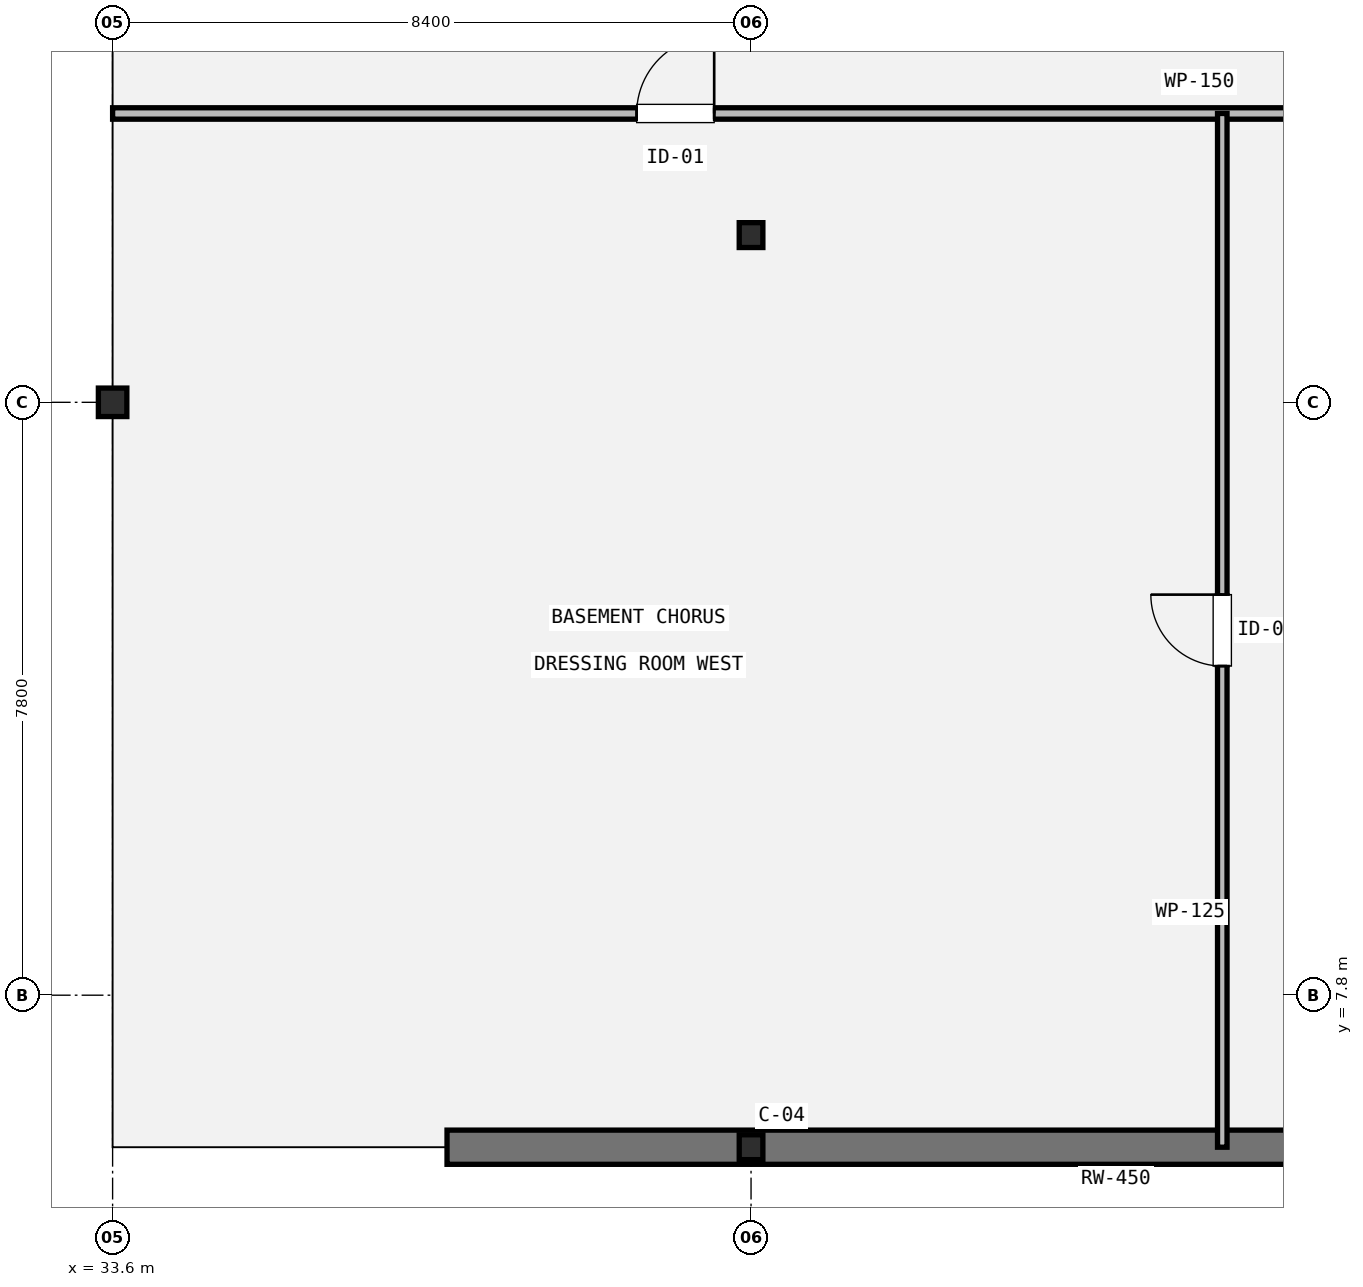
"""IFC4 building model, lengths in metres.
Left out: names, types, materials, properties, quantities, classifications, styles, units other than length and angle.
Written with IfcOpenShell. Run it as: python <this file> out.ifc"""

import sys

from ifc_helpers import new_model, si_unit, direction, frame, frame_2d, origin, origin_2d, place, context, subcontext, project, spatial, rectangle, i_section, extrude, element, fill, save


model = new_model("IFC4")
c1 = context("Model", 3, precision=1e-05, world=origin(), true_north=direction((0.0, 1.0)))
c2 = subcontext(c1, "Body", "Model", "MODEL_VIEW")
j1 = project(units=[si_unit("LENGTHUNIT", "METRE"), si_unit("PLANEANGLEUNIT", "RADIAN")], contexts=[c1])
p1 = place(None, origin())
s1 = spatial("IfcSite", under=j1, at=p1, CompositionType="ELEMENT")
p2 = place(p1, origin())
s2 = spatial("IfcBuilding", under=s1, at=p2, CompositionType="ELEMENT")
p3 = place(p2, frame((0.0, 0.0, -4.5)))
s3 = spatial("IfcBuildingStorey", under=s2, at=p3, CompositionType="ELEMENT", Elevation=-4.5)
p4 = place(p3, frame((33.6, 15.6, 0.0), z_axis=(0.0, 0.0, 1.0), x_axis=(1.0, 0.0, 0.0)))
e1 = element("IfcColumn", 1, at=p4, inside=s3, PredefinedType="COLUMN", context=c2, shape_type="SweptSolid", body=[
    extrude(i_section(OverallWidth=0.375, OverallDepth=0.375, WebThickness=0.017, FlangeThickness=0.027, FilletRadius=0.015, at=origin_2d()), origin(), (0.0, 0.0, 1.0), 4.5),
])
for number, where, z_axis, x_axis in (
    (2, (42.0, 5.8, 0.0), (0.0, 0.0, 1.0), (1.0, 0.0, 0.0)),
    (3, (42.0, 17.8, 0.0), (0.0, 0.0, 1.0), (1.0, 0.0, 0.0)),
):
    element("IfcColumn", number, at=place(p3, frame(where, z_axis=z_axis, x_axis=x_axis)), inside=s3, PredefinedType="COLUMN", context=c2, shape_type="SweptSolid", body=[
        extrude(i_section(OverallWidth=0.311, OverallDepth=0.327, WebThickness=0.016, FlangeThickness=0.025, FilletRadius=0.015, at=origin_2d()), origin(), (0.0, 0.0, 1.0), 4.5),
    ])
p5 = place(p3, frame((117.6, 5.8, 0.0), z_axis=(0.0, 0.0, 1.0), x_axis=(-1.0, 0.0, 0.0)))
e4 = element("IfcWall", 4, at=p5, inside=s3, PredefinedType="USERDEFINED", context=c2, shape_type="SweptSolid", body=[
    extrude(rectangle(XDim=79.6, YDim=0.45, at=frame_2d((39.8, 0.0))), origin(), (0.0, 0.0, 1.0), 4.24),
])
p6 = place(p3, frame((33.6, 19.4, 0.0), z_axis=(0.0, 0.0, 1.0), x_axis=(1.0, 0.0, 0.0)))
e5 = element("IfcWall", 5, at=p6, inside=s3, PredefinedType="PARTITIONING", context=c2, shape_type="SweptSolid", body=[
    extrude(rectangle(XDim=28.6, YDim=0.15, at=frame_2d((14.3, 0.0))), origin(), (0.0, 0.0, 1.0), 3.703),
])
p7 = place(p6, frame((6.895, 0.0, 0.0)))
e6 = element("IfcOpeningElement", 6, at=p7, cuts=e5, PredefinedType="OPENING", context=c2, shape_type="SweptSolid", body=[
    extrude(rectangle(XDim=1.02, YDim=2.1, at=frame_2d((0.51, 1.05))), frame((0.0, 0.085, 0.0), z_axis=(0.0, -1.0, 0.0), x_axis=(1.0, 0.0, 0.0)), (0.0, 0.0, 1.0), 0.17),
])
p8 = place(p6, frame((20.685, 0.0, 0.0)))
e7 = element("IfcOpeningElement", 7, at=p8, cuts=e5, PredefinedType="OPENING", context=c2, shape_type="SweptSolid", body=[
    extrude(rectangle(XDim=1.02, YDim=2.1, at=frame_2d((0.51, 1.05))), frame((0.0, 0.085, 0.0), z_axis=(0.0, -1.0, 0.0), x_axis=(1.0, 0.0, 0.0)), (0.0, 0.0, 1.0), 0.17),
])
p9 = place(p3, frame((48.2, 5.8, 0.0), z_axis=(0.0, 0.0, 1.0), x_axis=(0.0, 1.0, 0.0)))
e8 = element("IfcWall", 8, at=p9, inside=s3, PredefinedType="PARTITIONING", context=c2, shape_type="SweptSolid", body=[
    extrude(rectangle(XDim=13.6, YDim=0.125, at=frame_2d((6.8, 0.0))), origin(), (0.0, 0.0, 1.0), 3.709),
])
p10 = place(p9, frame((6.33, 0.0, 0.0)))
e9 = element("IfcOpeningElement", 9, at=p10, cuts=e8, PredefinedType="OPENING", context=c2, shape_type="SweptSolid", body=[
    extrude(rectangle(XDim=0.94, YDim=2.1, at=frame_2d((0.47, 1.05))), frame((0.0, 0.073, 0.0), z_axis=(0.0, -1.0, 0.0), x_axis=(1.0, 0.0, 0.0)), (0.0, 0.0, 1.0), 0.145),
])
p11 = place(p7, origin())
e10 = element("IfcDoor", 10, at=p11, inside=s3, OperationType="SINGLE_SWING_RIGHT", PredefinedType="DOOR", context=c2, shape_type="SweptSolid", body=[
    extrude(rectangle(XDim=1.02, YDim=2.1, at=frame_2d((0.51, 1.05))), frame((0.0, 0.025, 0.0), z_axis=(0.0, -1.0, 0.0), x_axis=(1.0, 0.0, 0.0)), (0.0, 0.0, 1.0), 0.05),
])
fill(e6, e10)
p12 = place(p10, origin())
e11 = element("IfcDoor", 11, at=p12, inside=s3, OperationType="SINGLE_SWING_RIGHT", PredefinedType="DOOR", context=c2, shape_type="SweptSolid", body=[
    extrude(rectangle(XDim=0.94, YDim=2.1, at=frame_2d((0.47, 1.05))), frame((0.0, 0.025, 0.0), z_axis=(0.0, -1.0, 0.0), x_axis=(1.0, 0.0, 0.0)), (0.0, 0.0, 1.0), 0.05),
])
fill(e9, e11)
save(model, sys.argv[1])
